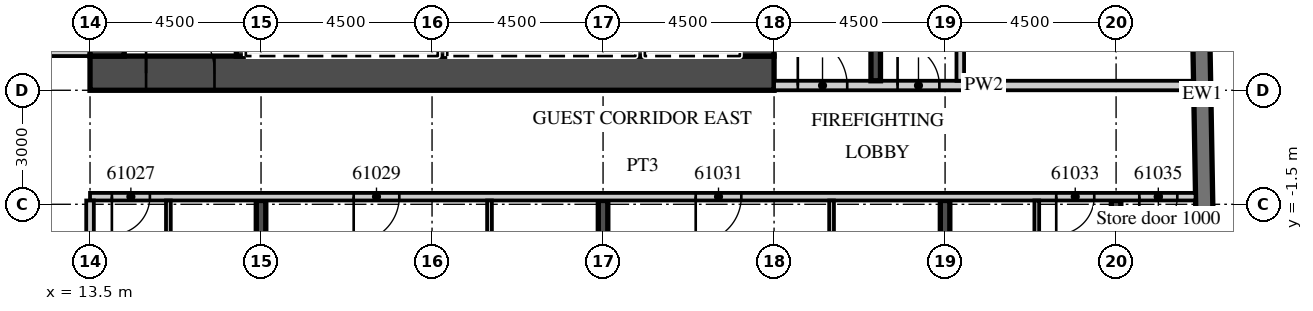
"""IFC4 building model, lengths in metres.
Left out: names, types, materials, properties, quantities, classifications, styles, units other than length and angle.
Written with IfcOpenShell. Run it as: python <this file> out.ifc"""

import sys

from ifc_helpers import new_model, si_unit, direction, frame, frame_2d, origin, place, context, subcontext, project, spatial, rectangle, extrude, element, fill, save


model = new_model("IFC4")
c1 = context("Model", 3, precision=1e-05, world=origin(), true_north=direction((0.0, 1.0)))
c2 = subcontext(c1, "Body", "Model", "MODEL_VIEW")
j1 = project(units=[si_unit("LENGTHUNIT", "METRE"), si_unit("PLANEANGLEUNIT", "RADIAN")], contexts=[c1])
p1 = place(None, origin())
s1 = spatial("IfcSite", under=j1, at=p1, CompositionType="ELEMENT")
p2 = place(p1, origin())
s2 = spatial("IfcBuilding", under=s1, at=p2, CompositionType="ELEMENT")
p3 = place(p2, frame((0.0, 0.0, 247.4)))
s3 = spatial("IfcBuildingStorey", under=s2, at=p3, CompositionType="ELEMENT", Elevation=247.4)
p4 = place(p3, frame((18.0, -19.079, 0.0), z_axis=(0.0, 0.0, 1.0), x_axis=(0.0, 1.0, 0.0)))
e1 = element("IfcWall", 1, at=p4, inside=s3, PredefinedType="SHEAR", context=c2, shape_type="SweptSolid", body=[
    extrude(rectangle(XDim=17.679, YDim=0.25, at=frame_2d((8.84, 0.0))), origin(), (0.0, 0.0, 1.0), 3.3),
])
p5 = place(p3, frame((27.0, -18.922, 0.0), z_axis=(0.0, 0.0, 1.0), x_axis=(0.0, 1.0, 0.0)))
e2 = element("IfcWall", 2, at=p5, inside=s3, PredefinedType="SHEAR", context=c2, shape_type="SweptSolid", body=[
    extrude(rectangle(XDim=17.522, YDim=0.25, at=frame_2d((8.761, 0.0))), origin(), (0.0, 0.0, 1.0), 3.3),
])
p6 = place(p3, frame((36.0, -18.765, 0.0), z_axis=(0.0, 0.0, 1.0), x_axis=(0.0, 1.0, 0.0)))
e3 = element("IfcWall", 3, at=p6, inside=s3, PredefinedType="SHEAR", context=c2, shape_type="SweptSolid", body=[
    extrude(rectangle(XDim=17.365, YDim=0.25, at=frame_2d((8.683, 0.0))), origin(), (0.0, 0.0, 1.0), 3.3),
])
p7 = place(p3, frame((40.5, -18.325, 0.0), z_axis=(0.0, 0.0, 1.0), x_axis=(0.0, 1.0, 0.0)))
e4 = element("IfcWall", 4, at=p7, inside=s3, PredefinedType="SHEAR", context=c2, shape_type="SweptSolid", body=[
    extrude(rectangle(XDim=16.925, YDim=0.25, at=frame_2d((8.463, 0.0))), origin(), (0.0, 0.0, 1.0), 3.3),
])
p8 = place(p3, frame((43.057, -15.103, 0.0), z_axis=(0.0, 0.0, 1.0), x_axis=(-0.017452408953, 0.999847695112, 0.0)))
e5 = element("IfcWall", 5, at=p8, inside=s3, PredefinedType="SOLIDWALL", context=c2, shape_type="SweptSolid", body=[
    extrude(rectangle(XDim=33.0, YDim=0.45, at=frame_2d((16.5, 0.0))), origin(), (0.0, 0.0, 1.0), 3.02),
])
p9 = place(p3, frame((-13.5, 2.5, 0.0), z_axis=(0.0, 0.0, 1.0), x_axis=(1.0, 0.0, 0.0)))
e6 = element("IfcWall", 6, at=p9, inside=s3, PredefinedType="PARTITIONING", context=c2, shape_type="SweptSolid", body=[
    extrude(rectangle(XDim=27.0, YDim=0.2, at=frame_2d((13.5, 0.0))), origin(), (0.0, 0.0, 1.0), 3.02),
])
p10 = place(p9, frame((0.575, 0.0, 0.0)))
e7 = element("IfcOpeningElement", 7, at=p10, cuts=e6, PredefinedType="OPENING", context=c2, shape_type="SweptSolid", body=[
    extrude(rectangle(XDim=1.0, YDim=2.1, at=frame_2d((0.5, 1.05))), frame((0.0, 0.11, 0.0), z_axis=(0.0, -1.0, 0.0), x_axis=(1.0, 0.0, 0.0)), (0.0, 0.0, 1.0), 0.22),
])
p11 = place(p9, frame((6.938, 0.0, 0.0)))
e8 = element("IfcOpeningElement", 8, at=p11, cuts=e6, PredefinedType="OPENING", context=c2, shape_type="SweptSolid", body=[
    extrude(rectangle(XDim=1.2, YDim=2.1, at=frame_2d((0.6, 1.05))), frame((0.0, 0.11, 0.0), z_axis=(0.0, -1.0, 0.0), x_axis=(1.0, 0.0, 0.0)), (0.0, 0.0, 1.0), 0.22),
])
p12 = place(p9, frame((15.938, 0.0, 0.0)))
e9 = element("IfcOpeningElement", 9, at=p12, cuts=e6, PredefinedType="OPENING", context=c2, shape_type="SweptSolid", body=[
    extrude(rectangle(XDim=1.2, YDim=2.1, at=frame_2d((0.6, 1.05))), frame((0.0, 0.11, 0.0), z_axis=(0.0, -1.0, 0.0), x_axis=(1.0, 0.0, 0.0)), (0.0, 0.0, 1.0), 0.22),
])
p13 = place(p9, frame((23.075, 0.0, 0.0)))
e10 = element("IfcOpeningElement", 10, at=p13, cuts=e6, PredefinedType="OPENING", context=c2, shape_type="SweptSolid", body=[
    extrude(rectangle(XDim=1.0, YDim=2.1, at=frame_2d((0.5, 1.05))), frame((0.0, 0.11, 0.0), z_axis=(0.0, -1.0, 0.0), x_axis=(1.0, 0.0, 0.0)), (0.0, 0.0, 1.0), 0.22),
])
p14 = place(p3, frame((13.5, -1.3, 0.0), z_axis=(0.0, 0.0, 1.0), x_axis=(1.0, 0.0, 0.0)))
e11 = element("IfcWall", 11, at=p14, inside=s3, PredefinedType="PARTITIONING", context=c2, shape_type="SweptSolid", body=[
    extrude(rectangle(XDim=29.091, YDim=0.2, at=frame_2d((14.545, 0.0))), origin(), (0.0, 0.0, 1.0), 3.02),
])
p15 = place(p14, frame((0.575, 0.0, 0.0)))
e12 = element("IfcOpeningElement", 12, at=p15, cuts=e11, PredefinedType="OPENING", context=c2, shape_type="SweptSolid", body=[
    extrude(rectangle(XDim=1.0, YDim=2.1, at=frame_2d((0.5, 1.05))), frame((0.0, 0.11, 0.0), z_axis=(0.0, -1.0, 0.0), x_axis=(1.0, 0.0, 0.0)), (0.0, 0.0, 1.0), 0.22),
])
p16 = place(p14, frame((6.938, 0.0, 0.0)))
e13 = element("IfcOpeningElement", 13, at=p16, cuts=e11, PredefinedType="OPENING", context=c2, shape_type="SweptSolid", body=[
    extrude(rectangle(XDim=1.2, YDim=2.1, at=frame_2d((0.6, 1.05))), frame((0.0, 0.11, 0.0), z_axis=(0.0, -1.0, 0.0), x_axis=(1.0, 0.0, 0.0)), (0.0, 0.0, 1.0), 0.22),
])
p17 = place(p14, frame((15.938, 0.0, 0.0)))
e14 = element("IfcOpeningElement", 14, at=p17, cuts=e11, PredefinedType="OPENING", context=c2, shape_type="SweptSolid", body=[
    extrude(rectangle(XDim=1.2, YDim=2.1, at=frame_2d((0.6, 1.05))), frame((0.0, 0.11, 0.0), z_axis=(0.0, -1.0, 0.0), x_axis=(1.0, 0.0, 0.0)), (0.0, 0.0, 1.0), 0.22),
])
p18 = place(p14, frame((25.425, 0.0, 0.0)))
e15 = element("IfcOpeningElement", 15, at=p18, cuts=e11, PredefinedType="OPENING", context=c2, shape_type="SweptSolid", body=[
    extrude(rectangle(XDim=1.0, YDim=2.1, at=frame_2d((0.5, 1.05))), frame((0.0, 0.11, 0.0), z_axis=(0.0, -1.0, 0.0), x_axis=(1.0, 0.0, 0.0)), (0.0, 0.0, 1.0), 0.22),
])
p19 = place(p14, frame((27.611, 0.0, 0.0)))
e16 = element("IfcOpeningElement", 16, at=p19, cuts=e11, PredefinedType="OPENING", context=c2, shape_type="SweptSolid", body=[
    extrude(rectangle(XDim=1.0, YDim=2.4, at=frame_2d((0.5, 1.2))), frame((0.0, 0.11, 0.0), z_axis=(0.0, -1.0, 0.0), x_axis=(1.0, 0.0, 0.0)), (0.0, 0.0, 1.0), 0.22),
])
p20 = place(p3, frame((13.5, -19.17, 0.0), z_axis=(0.0, 0.0, 1.0), x_axis=(0.0, 1.0, 0.0)))
e17 = element("IfcWall", 17, at=p20, inside=s3, PredefinedType="PARTITIONING", context=c2, shape_type="SweptSolid", body=[
    extrude(rectangle(XDim=17.77, YDim=0.2, at=frame_2d((8.885, 0.0))), origin(), (0.0, 0.0, 1.0), 3.02),
])
p21 = place(p3, frame((15.562, -9.125, 0.0), z_axis=(0.0, 0.0, 1.0), x_axis=(0.0, 1.0, 0.0)))
e18 = element("IfcWall", 18, at=p21, inside=s3, PredefinedType="PARTITIONING", context=c2, shape_type="SweptSolid", body=[
    extrude(rectangle(XDim=7.725, YDim=0.125, at=frame_2d((3.863, 0.0))), origin(), (0.0, 0.0, 1.0), 3.02),
])
p22 = place(p21, frame((4.375, 0.0, 0.0)))
e19 = element("IfcOpeningElement", 19, at=p22, cuts=e18, PredefinedType="OPENING", context=c2, shape_type="SweptSolid", body=[
    extrude(rectangle(XDim=0.9, YDim=2.1, at=frame_2d((0.45, 1.05))), frame((0.0, 0.073, 0.0), z_axis=(0.0, -1.0, 0.0), x_axis=(1.0, 0.0, 0.0)), (0.0, 0.0, 1.0), 0.145),
])
p23 = place(p3, frame((24.012, -9.125, 0.0), z_axis=(0.0, 0.0, 1.0), x_axis=(0.0, 1.0, 0.0)))
e20 = element("IfcWall", 20, at=p23, inside=s3, PredefinedType="PARTITIONING", context=c2, shape_type="SweptSolid", body=[
    extrude(rectangle(XDim=7.725, YDim=0.125, at=frame_2d((3.863, 0.0))), origin(), (0.0, 0.0, 1.0), 3.02),
])
p24 = place(p23, frame((4.375, 0.0, 0.0)))
e21 = element("IfcOpeningElement", 21, at=p24, cuts=e20, PredefinedType="OPENING", context=c2, shape_type="SweptSolid", body=[
    extrude(rectangle(XDim=0.9, YDim=2.1, at=frame_2d((0.45, 1.05))), frame((0.0, 0.073, 0.0), z_axis=(0.0, -1.0, 0.0), x_axis=(1.0, 0.0, 0.0)), (0.0, 0.0, 1.0), 0.145),
])
p25 = place(p3, frame((33.013, -9.125, 0.0), z_axis=(0.0, 0.0, 1.0), x_axis=(0.0, 1.0, 0.0)))
e22 = element("IfcWall", 22, at=p25, inside=s3, PredefinedType="PARTITIONING", context=c2, shape_type="SweptSolid", body=[
    extrude(rectangle(XDim=7.725, YDim=0.125, at=frame_2d((3.863, 0.0))), origin(), (0.0, 0.0, 1.0), 3.02),
])
p26 = place(p25, frame((4.375, 0.0, 0.0)))
e23 = element("IfcOpeningElement", 23, at=p26, cuts=e22, PredefinedType="OPENING", context=c2, shape_type="SweptSolid", body=[
    extrude(rectangle(XDim=0.9, YDim=2.1, at=frame_2d((0.45, 1.05))), frame((0.0, 0.073, 0.0), z_axis=(0.0, -1.0, 0.0), x_axis=(1.0, 0.0, 0.0)), (0.0, 0.0, 1.0), 0.145),
])
p27 = place(p3, frame((38.413, -9.125, 0.0), z_axis=(0.0, 0.0, 1.0), x_axis=(0.0, 1.0, 0.0)))
e24 = element("IfcWall", 24, at=p27, inside=s3, PredefinedType="PARTITIONING", context=c2, shape_type="SweptSolid", body=[
    extrude(rectangle(XDim=7.725, YDim=0.125, at=frame_2d((3.863, 0.0))), origin(), (0.0, 0.0, 1.0), 3.02),
])
p28 = place(p27, frame((4.375, 0.0, 0.0)))
e25 = element("IfcOpeningElement", 25, at=p28, cuts=e24, PredefinedType="OPENING", context=c2, shape_type="SweptSolid", body=[
    extrude(rectangle(XDim=0.9, YDim=2.1, at=frame_2d((0.45, 1.05))), frame((0.0, 0.073, 0.0), z_axis=(0.0, -1.0, 0.0), x_axis=(1.0, 0.0, 0.0)), (0.0, 0.0, 1.0), 0.145),
])
p29 = place(p3, frame((13.5, 1.95, 0.0), z_axis=(0.0, 0.0, 1.0), x_axis=(1.0, 0.0, 0.0)))
e26 = element("IfcWall", 26, at=p29, inside=s3, PredefinedType="SHEAR", context=c2, shape_type="SweptSolid", body=[
    extrude(rectangle(XDim=18.0, YDim=0.9, at=frame_2d((9.0, 0.0))), origin(), (0.0, 0.0, 1.0), 3.02),
])
p30 = place(p29, frame((1.475, 0.0, 0.0)))
e27 = element("IfcOpeningElement", 27, at=p30, cuts=e26, PredefinedType="OPENING", context=c2, shape_type="SweptSolid", body=[
    extrude(rectangle(XDim=1.8, YDim=2.1, at=frame_2d((0.9, 1.05))), frame((0.0, 0.46, 0.0), z_axis=(0.0, -1.0, 0.0), x_axis=(1.0, 0.0, 0.0)), (0.0, 0.0, 1.0), 0.92),
])
p31 = place(p3, frame((31.05, 2.4, 0.0), z_axis=(0.0, 0.0, 1.0), x_axis=(0.0, 1.0, 0.0)))
e28 = element("IfcWall", 28, at=p31, inside=s3, PredefinedType="SHEAR", context=c2, shape_type="SweptSolid", body=[
    extrude(rectangle(XDim=12.8, YDim=0.9, at=frame_2d((6.4, 0.0))), origin(), (0.0, 0.0, 1.0), 3.02),
])
p32 = place(p31, frame((0.2, 0.0, 0.0)))
e29 = element("IfcOpeningElement", 29, at=p32, cuts=e28, PredefinedType="OPENING", context=c2, shape_type="SweptSolid", body=[
    extrude(rectangle(XDim=1.1, YDim=2.1, at=frame_2d((0.55, 1.05))), frame((0.0, 0.46, 0.0), z_axis=(0.0, -1.0, 0.0), x_axis=(1.0, 0.0, 0.0)), (0.0, 0.0, 1.0), 0.92),
])
p33 = place(p3, frame((13.95, 2.4, 0.0), z_axis=(0.0, 0.0, 1.0), x_axis=(0.0, 1.0, 0.0)))
e30 = element("IfcWall", 30, at=p33, inside=s3, PredefinedType="SHEAR", context=c2, shape_type="SweptSolid", body=[
    extrude(rectangle(XDim=12.2, YDim=0.9, at=frame_2d((6.1, 0.0))), origin(), (0.0, 0.0, 1.0), 3.02),
])
p34 = place(p3, frame((17.475, 2.4, 0.0), z_axis=(0.0, 0.0, 1.0), x_axis=(0.0, 1.0, 0.0)))
e31 = element("IfcWall", 31, at=p34, inside=s3, PredefinedType="SHEAR", context=c2, shape_type="SweptSolid", body=[
    extrude(rectangle(XDim=3.15, YDim=0.25, at=frame_2d((1.575, 0.0))), origin(), (0.0, 0.0, 1.0), 3.02),
])
for number, where, z_axis, x_axis in (
    (32, (27.975, 2.4, 0.0), (0.0, 0.0, 1.0), (0.0, 1.0, 0.0)),
    (33, (22.775, 2.4, 0.0), (0.0, 0.0, 1.0), (0.0, 1.0, 0.0)),
):
    element("IfcWall", number, at=place(p3, frame(where, z_axis=z_axis, x_axis=x_axis)), inside=s3, PredefinedType="SHEAR", context=c2, shape_type="SweptSolid", body=[
        extrude(rectangle(XDim=2.9, YDim=0.25, at=frame_2d((1.45, 0.0))), origin(), (0.0, 0.0, 1.0), 3.02),
    ])
p35 = place(p3, frame((31.5, 1.625, 0.0), z_axis=(0.0, 0.0, 1.0), x_axis=(1.0, 0.0, 0.0)))
e34 = element("IfcWall", 34, at=p35, inside=s3, PredefinedType="PARTITIONING", context=c2, shape_type="SweptSolid", body=[
    extrude(rectangle(XDim=11.04, YDim=0.25, at=frame_2d((5.52, 0.0))), origin(), (0.0, 0.0, 1.0), 3.02),
])
p36 = place(p35, frame((0.625, 0.0, 0.0)))
e35 = element("IfcOpeningElement", 35, at=p36, cuts=e34, PredefinedType="OPENING", context=c2, shape_type="SweptSolid", body=[
    extrude(rectangle(XDim=1.3, YDim=2.1, at=frame_2d((0.65, 1.05))), frame((0.0, 0.135, 0.0), z_axis=(0.0, -1.0, 0.0), x_axis=(1.0, 0.0, 0.0)), (0.0, 0.0, 1.0), 0.27),
])
p37 = place(p35, frame((3.25, 0.0, 0.0)))
e36 = element("IfcOpeningElement", 36, at=p37, cuts=e34, PredefinedType="OPENING", context=c2, shape_type="SweptSolid", body=[
    extrude(rectangle(XDim=1.1, YDim=2.1, at=frame_2d((0.55, 1.05))), frame((0.0, 0.135, 0.0), z_axis=(0.0, -1.0, 0.0), x_axis=(1.0, 0.0, 0.0)), (0.0, 0.0, 1.0), 0.27),
])
p38 = place(p3, frame((34.175, 1.75, 0.0), z_axis=(0.0, 0.0, 1.0), x_axis=(0.0, 1.0, 0.0)))
e37 = element("IfcWall", 37, at=p38, inside=s3, PredefinedType="SHEAR", context=c2, shape_type="SweptSolid", body=[
    extrude(rectangle(XDim=8.35, YDim=0.25, at=frame_2d((4.175, 0.0))), origin(), (0.0, 0.0, 1.0), 3.02),
])
p39 = place(p3, frame((36.4, 1.75, 0.0), z_axis=(0.0, 0.0, 1.0), x_axis=(0.0, 1.0, 0.0)))
e38 = element("IfcWall", 38, at=p39, inside=s3, PredefinedType="PARTITIONING", context=c2, shape_type="SweptSolid", body=[
    extrude(rectangle(XDim=15.95, YDim=0.2, at=frame_2d((7.975, 0.0))), origin(), (0.0, 0.0, 1.0), 3.02),
])
p40 = place(p39, frame((14.7, 0.0, 0.0)))
e39 = element("IfcOpeningElement", 39, at=p40, cuts=e38, PredefinedType="OPENING", context=c2, shape_type="SweptSolid", body=[
    extrude(rectangle(XDim=0.9, YDim=2.1, at=frame_2d((0.45, 1.05))), frame((0.0, 0.11, 0.0), z_axis=(0.0, -1.0, 0.0), x_axis=(1.0, 0.0, 0.0)), (0.0, 0.0, 1.0), 0.22),
])
p41 = place(p15, origin())
e40 = element("IfcDoor", 40, at=p41, inside=s3, OperationType="SINGLE_SWING_LEFT", PredefinedType="DOOR", context=c2, shape_type="SweptSolid", body=[
    extrude(rectangle(XDim=1.0, YDim=2.1, at=frame_2d((0.5, 1.05))), frame((0.0, 0.025, 0.0), z_axis=(0.0, -1.0, 0.0), x_axis=(1.0, 0.0, 0.0)), (0.0, 0.0, 1.0), 0.05),
])
fill(e12, e40)
p42 = place(p16, origin())
e41 = element("IfcDoor", 41, at=p42, inside=s3, OperationType="SINGLE_SWING_LEFT", PredefinedType="DOOR", context=c2, shape_type="SweptSolid", body=[
    extrude(rectangle(XDim=1.2, YDim=2.1, at=frame_2d((0.6, 1.05))), frame((0.0, 0.025, 0.0), z_axis=(0.0, -1.0, 0.0), x_axis=(1.0, 0.0, 0.0)), (0.0, 0.0, 1.0), 0.05),
])
fill(e13, e41)
p43 = place(p17, origin())
e42 = element("IfcDoor", 42, at=p43, inside=s3, OperationType="SINGLE_SWING_LEFT", PredefinedType="DOOR", context=c2, shape_type="SweptSolid", body=[
    extrude(rectangle(XDim=1.2, YDim=2.1, at=frame_2d((0.6, 1.05))), frame((0.0, 0.025, 0.0), z_axis=(0.0, -1.0, 0.0), x_axis=(1.0, 0.0, 0.0)), (0.0, 0.0, 1.0), 0.05),
])
fill(e14, e42)
p44 = place(p18, origin())
e43 = element("IfcDoor", 43, at=p44, inside=s3, OperationType="SINGLE_SWING_LEFT", PredefinedType="DOOR", context=c2, shape_type="SweptSolid", body=[
    extrude(rectangle(XDim=1.0, YDim=2.1, at=frame_2d((0.5, 1.05))), frame((0.0, 0.025, 0.0), z_axis=(0.0, -1.0, 0.0), x_axis=(1.0, 0.0, 0.0)), (0.0, 0.0, 1.0), 0.05),
])
fill(e15, e43)
p45 = place(p19, origin())
e44 = element("IfcDoor", 44, at=p45, inside=s3, OperationType="SINGLE_SWING_LEFT", PredefinedType="DOOR", context=c2, shape_type="SweptSolid", body=[
    extrude(rectangle(XDim=1.0, YDim=2.4, at=frame_2d((0.5, 1.2))), frame((0.0, 0.025, 0.0), z_axis=(0.0, -1.0, 0.0), x_axis=(1.0, 0.0, 0.0)), (0.0, 0.0, 1.0), 0.05),
])
fill(e16, e44)
p46 = place(p30, origin())
e45 = element("IfcDoor", 45, at=p46, inside=s3, OperationType="DOUBLE_DOOR_DOUBLE_SWING", PredefinedType="DOOR", context=c2, shape_type="SweptSolid", body=[
    extrude(rectangle(XDim=1.8, YDim=2.1, at=frame_2d((0.9, 1.05))), frame((0.0, 0.025, 0.0), z_axis=(0.0, -1.0, 0.0), x_axis=(1.0, 0.0, 0.0)), (0.0, 0.0, 1.0), 0.05),
])
fill(e27, e45)
p47 = place(p36, origin())
e46 = element("IfcDoor", 46, at=p47, inside=s3, OperationType="SINGLE_SWING_LEFT", PredefinedType="DOOR", context=c2, shape_type="SweptSolid", body=[
    extrude(rectangle(XDim=1.3, YDim=2.1, at=frame_2d((0.65, 1.05))), frame((0.0, 0.025, 0.0), z_axis=(0.0, -1.0, 0.0), x_axis=(1.0, 0.0, 0.0)), (0.0, 0.0, 1.0), 0.05),
])
fill(e35, e46)
p48 = place(p37, origin())
e47 = element("IfcDoor", 47, at=p48, inside=s3, OperationType="SINGLE_SWING_LEFT", PredefinedType="DOOR", context=c2, shape_type="SweptSolid", body=[
    extrude(rectangle(XDim=1.1, YDim=2.1, at=frame_2d((0.55, 1.05))), frame((0.0, 0.025, 0.0), z_axis=(0.0, -1.0, 0.0), x_axis=(1.0, 0.0, 0.0)), (0.0, 0.0, 1.0), 0.05),
])
fill(e36, e47)
save(model, sys.argv[1])
